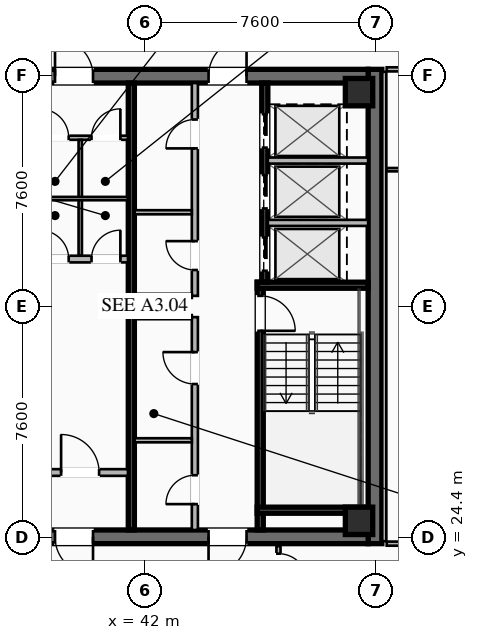
"""IFC4 building model, lengths in metres.
Left out: names, types, materials, properties, quantities, classifications, styles, units other than length and angle.
Written with IfcOpenShell. Run it as: python <this file> out.ifc"""

import sys

from ifc_helpers import new_model, si_unit, direction, frame, frame_2d, origin, origin_2d, place, context, subcontext, project, spatial, rectangle, hollow_rectangle, extrude, element, fill, save


model = new_model("IFC4")
c1 = context("Model", 3, precision=1e-05, world=origin(), true_north=direction((0.0, 1.0)))
c2 = subcontext(c1, "Body", "Model", "MODEL_VIEW")
j1 = project(units=[si_unit("LENGTHUNIT", "METRE"), si_unit("PLANEANGLEUNIT", "RADIAN")], contexts=[c1])
p1 = place(None, origin())
s1 = spatial("IfcSite", under=j1, at=p1, CompositionType="ELEMENT")
p2 = place(p1, origin())
s2 = spatial("IfcBuilding", under=s1, at=p2, CompositionType="ELEMENT")
p3 = place(p2, frame((0.0, 0.0, 218.4)))
s3 = spatial("IfcBuildingStorey", under=s2, at=p3, CompositionType="ELEMENT", Elevation=218.4)
p4 = place(p3, frame((49.575, 39.8, 0.0), z_axis=(0.0, 0.0, 1.0), x_axis=(0.0, -1.0, 0.0)))
e1 = element("IfcWall", 1, at=p4, inside=s3, PredefinedType="SHEAR", context=c2, shape_type="SweptSolid", body=[
    extrude(rectangle(XDim=15.6, YDim=0.45, at=frame_2d((7.8, 0.0))), origin(), (0.0, 0.0, 1.0), 3.55),
])
p5 = place(p3, frame((49.35, 24.425, 0.0), z_axis=(0.0, 0.0, 1.0), x_axis=(-1.0, 0.0, 0.0)))
e2 = element("IfcWall", 2, at=p5, inside=s3, PredefinedType="SHEAR", context=c2, shape_type="SweptSolid", body=[
    extrude(rectangle(XDim=14.7, YDim=0.45, at=frame_2d((7.35, 0.0))), origin(), (0.0, 0.0, 1.0), 3.55),
])
p6 = place(p5, frame((9.05, 0.0, 0.0)))
e3 = element("IfcOpeningElement", 3, at=p6, cuts=e2, PredefinedType="OPENING", context=c2, shape_type="SweptSolid", body=[
    extrude(rectangle(XDim=1.25, YDim=2.25, at=frame_2d((0.625, 1.125))), frame((0.0, 0.235, 0.0), z_axis=(0.0, -1.0, 0.0), x_axis=(1.0, 0.0, 0.0)), (0.0, 0.0, 1.0), 0.47),
])
p7 = place(p5, frame((4.0, 0.0, 0.0)))
e4 = element("IfcOpeningElement", 4, at=p7, cuts=e2, PredefinedType="OPENING", context=c2, shape_type="SweptSolid", body=[
    extrude(rectangle(XDim=1.25, YDim=2.25, at=frame_2d((0.625, 1.125))), frame((0.0, 0.235, 0.0), z_axis=(0.0, -1.0, 0.0), x_axis=(1.0, 0.0, 0.0)), (0.0, 0.0, 1.0), 0.47),
])
p8 = place(p3, frame((34.65, 39.575, 0.0), z_axis=(0.0, 0.0, 1.0), x_axis=(1.0, 0.0, 0.0)))
e5 = element("IfcWall", 5, at=p8, inside=s3, PredefinedType="SHEAR", context=c2, shape_type="SweptSolid", body=[
    extrude(rectangle(XDim=14.7, YDim=0.45, at=frame_2d((7.35, 0.0))), origin(), (0.0, 0.0, 1.0), 3.55),
])
p9 = place(p8, frame((4.4, 0.0, 0.0)))
e6 = element("IfcOpeningElement", 6, at=p9, cuts=e5, PredefinedType="OPENING", context=c2, shape_type="SweptSolid", body=[
    extrude(rectangle(XDim=1.25, YDim=2.25, at=frame_2d((0.625, 1.125))), frame((0.0, 0.235, 0.0), z_axis=(0.0, -1.0, 0.0), x_axis=(1.0, 0.0, 0.0)), (0.0, 0.0, 1.0), 0.47),
])
p10 = place(p8, frame((9.45, 0.0, 0.0)))
e7 = element("IfcOpeningElement", 7, at=p10, cuts=e5, PredefinedType="OPENING", context=c2, shape_type="SweptSolid", body=[
    extrude(rectangle(XDim=1.25, YDim=2.25, at=frame_2d((0.625, 1.125))), frame((0.0, 0.235, 0.0), z_axis=(0.0, -1.0, 0.0), x_axis=(1.0, 0.0, 0.0)), (0.0, 0.0, 1.0), 0.47),
])
for number, where, z_axis, x_axis in (
    (8, (49.05, 24.95, 0.0), (0.0, 0.0, 1.0), (1.0, 0.0, 0.0)),
    (9, (49.05, 39.05, 0.0), (0.0, 0.0, 1.0), (1.0, 0.0, 0.0)),
):
    element("IfcColumn", number, at=place(p3, frame(where, z_axis=z_axis, x_axis=x_axis)), inside=s3, PredefinedType="COLUMN", context=c2, shape_type="SweptSolid", body=[
        extrude(hollow_rectangle(XDim=0.9, YDim=0.9, WallThickness=0.04, at=origin_2d()), origin(), (0.0, 0.0, 1.0), 3.37),
    ])
p11 = place(p3, frame((45.8, 32.8, 0.0), z_axis=(0.0, 0.0, 1.0), x_axis=(0.0, -1.0, 0.0)))
e10 = element("IfcWall", 10, at=p11, inside=s3, PredefinedType="SHEAR", context=c2, shape_type="SweptSolid", body=[
    extrude(rectangle(XDim=8.15, YDim=0.2, at=frame_2d((4.075, 0.0))), origin(), (0.0, 0.0, 1.0), 3.37),
])
p12 = place(p11, frame((0.45, 0.0, 0.0)))
e11 = element("IfcOpeningElement", 11, at=p12, cuts=e10, PredefinedType="OPENING", context=c2, shape_type="SweptSolid", body=[
    extrude(rectangle(XDim=1.15, YDim=2.2, at=frame_2d((0.575, 1.1))), frame((0.0, 0.11, 0.0), z_axis=(0.0, -1.0, 0.0), x_axis=(1.0, 0.0, 0.0)), (0.0, 0.0, 1.0), 0.22),
])
for number, where, z_axis, x_axis in (
    (12, (45.7, 32.7, 0.0), (0.0, 0.0, 1.0), (1.0, 0.0, 0.0)),
    (13, (45.7, 25.3, 0.0), (0.0, 0.0, 1.0), (1.0, 0.0, 0.0)),
):
    element("IfcWall", number, at=place(p3, frame(where, z_axis=z_axis, x_axis=x_axis)), inside=s3, PredefinedType="SHEAR", context=c2, shape_type="SweptSolid", body=[
        extrude(rectangle(XDim=3.65, YDim=0.2, at=frame_2d((1.825, 0.0))), origin(), (0.0, 0.0, 1.0), 3.37),
    ])
p13 = place(p3, frame((41.56, 24.65, 0.0), z_axis=(0.0, 0.0, 1.0), x_axis=(0.0, 1.0, 0.0)))
e14 = element("IfcWall", 14, at=p13, inside=s3, PredefinedType="SHEAR", context=c2, shape_type="SweptSolid", body=[
    extrude(rectangle(XDim=14.7, YDim=0.2, at=frame_2d((7.35, 0.0))), origin(), (0.0, 0.0, 1.0), 3.37),
])
p14 = place(p3, frame((38.3, 33.56, 0.0), z_axis=(0.0, 0.0, 1.0), x_axis=(1.0, 0.0, 0.0)))
e15 = element("IfcWall", 15, at=p14, inside=s3, PredefinedType="SOLIDWALL", context=c2, shape_type="SweptSolid", body=[
    extrude(rectangle(XDim=3.15, YDim=0.22, at=frame_2d((1.575, 0.0))), origin(), (0.0, 0.0, 1.0), 2.723),
])
p15 = place(p14, frame((0.25, 0.0, 0.0)))
e16 = element("IfcOpeningElement", 16, at=p15, cuts=e15, PredefinedType="OPENING", context=c2, shape_type="SweptSolid", body=[
    extrude(rectangle(XDim=0.95, YDim=2.05, at=frame_2d((0.475, 1.025))), frame((0.0, 0.12, 0.0), z_axis=(0.0, -1.0, 0.0), x_axis=(1.0, 0.0, 0.0)), (0.0, 0.0, 1.0), 0.24),
])
p16 = place(p14, frame((1.95, 0.0, 0.0)))
e17 = element("IfcOpeningElement", 17, at=p16, cuts=e15, PredefinedType="OPENING", context=c2, shape_type="SweptSolid", body=[
    extrude(rectangle(XDim=0.95, YDim=2.05, at=frame_2d((0.475, 1.025))), frame((0.0, 0.12, 0.0), z_axis=(0.0, -1.0, 0.0), x_axis=(1.0, 0.0, 0.0)), (0.0, 0.0, 1.0), 0.24),
])
p17 = place(p3, frame((38.3, 26.54, 0.0), z_axis=(0.0, 0.0, 1.0), x_axis=(1.0, 0.0, 0.0)))
e18 = element("IfcWall", 18, at=p17, inside=s3, PredefinedType="SOLIDWALL", context=c2, shape_type="SweptSolid", body=[
    extrude(rectangle(XDim=3.15, YDim=0.22, at=frame_2d((1.575, 0.0))), origin(), (0.0, 0.0, 1.0), 2.723),
])
p18 = place(p17, frame((0.95, 0.0, 0.0)))
e19 = element("IfcOpeningElement", 19, at=p18, cuts=e18, PredefinedType="OPENING", context=c2, shape_type="SweptSolid", body=[
    extrude(rectangle(XDim=1.25, YDim=2.25, at=frame_2d((0.625, 1.125))), frame((0.0, 0.12, 0.0), z_axis=(0.0, -1.0, 0.0), x_axis=(1.0, 0.0, 0.0)), (0.0, 0.0, 1.0), 0.24),
])
p19 = place(p3, frame((45.95, 39.35, 0.0), z_axis=(0.0, 0.0, 1.0), x_axis=(0.0, -1.0, 0.0)))
e20 = element("IfcWall", 20, at=p19, inside=s3, PredefinedType="SHEAR", context=c2, shape_type="SweptSolid", body=[
    extrude(rectangle(XDim=6.55, YDim=0.2, at=frame_2d((3.275, 0.0))), origin(), (0.0, 0.0, 1.0), 3.37),
])
p20 = place(p19, frame((5.075, 0.0, 0.0)))
e21 = element("IfcOpeningElement", 21, at=p20, cuts=e20, PredefinedType="OPENING", context=c2, shape_type="SweptSolid", body=[
    extrude(rectangle(XDim=1.1, YDim=2.2, at=frame_2d((0.55, 1.1))), frame((0.0, 0.11, 0.0), z_axis=(0.0, -1.0, 0.0), x_axis=(1.0, 0.0, 0.0)), (0.0, 0.0, 1.0), 0.22),
])
p21 = place(p19, frame((3.025, 0.0, 0.0)))
e22 = element("IfcOpeningElement", 22, at=p21, cuts=e20, PredefinedType="OPENING", context=c2, shape_type="SweptSolid", body=[
    extrude(rectangle(XDim=1.1, YDim=2.2, at=frame_2d((0.55, 1.1))), frame((0.0, 0.11, 0.0), z_axis=(0.0, -1.0, 0.0), x_axis=(1.0, 0.0, 0.0)), (0.0, 0.0, 1.0), 0.22),
])
p22 = place(p19, frame((1.025, 0.0, 0.0)))
e23 = element("IfcOpeningElement", 23, at=p22, cuts=e20, PredefinedType="OPENING", context=c2, shape_type="SweptSolid", body=[
    extrude(rectangle(XDim=1.1, YDim=2.2, at=frame_2d((0.55, 1.1))), frame((0.0, 0.11, 0.0), z_axis=(0.0, -1.0, 0.0), x_axis=(1.0, 0.0, 0.0)), (0.0, 0.0, 1.0), 0.22),
])
for number, where, z_axis, x_axis in (
    (24, (46.05, 34.75, 0.0), (0.0, 0.0, 1.0), (1.0, 0.0, 0.0)),
    (25, (46.05, 36.8, 0.0), (0.0, 0.0, 1.0), (1.0, 0.0, 0.0)),
):
    element("IfcWall", number, at=place(p3, frame(where, z_axis=z_axis, x_axis=x_axis)), inside=s3, PredefinedType="SOLIDWALL", context=c2, shape_type="SweptSolid", body=[
        extrude(rectangle(XDim=3.3, YDim=0.2, at=frame_2d((1.65, 0.0))), origin(), (0.0, 0.0, 1.0), 3.37),
    ])
p23 = place(p3, frame((38.3, 37.55, 0.0), z_axis=(0.0, 0.0, 1.0), x_axis=(1.0, 0.0, 0.0)))
e26 = element("IfcWall", 26, at=p23, inside=s3, PredefinedType="PARTITIONING", context=c2, shape_type="SweptSolid", body=[
    extrude(rectangle(XDim=3.15, YDim=0.135, at=frame_2d((1.575, 0.0))), origin(), (0.0, 0.0, 1.0), 2.723),
])
p24 = place(p23, frame((0.25, 0.0, 0.0)))
e27 = element("IfcOpeningElement", 27, at=p24, cuts=e26, PredefinedType="OPENING", context=c2, shape_type="SweptSolid", body=[
    extrude(rectangle(XDim=0.95, YDim=2.05, at=frame_2d((0.475, 1.025))), frame((0.0, 0.077, 0.0), z_axis=(0.0, -1.0, 0.0), x_axis=(1.0, 0.0, 0.0)), (0.0, 0.0, 1.0), 0.155),
])
p25 = place(p23, frame((1.95, 0.0, 0.0)))
e28 = element("IfcOpeningElement", 28, at=p25, cuts=e26, PredefinedType="OPENING", context=c2, shape_type="SweptSolid", body=[
    extrude(rectangle(XDim=0.95, YDim=2.05, at=frame_2d((0.475, 1.025))), frame((0.0, 0.077, 0.0), z_axis=(0.0, -1.0, 0.0), x_axis=(1.0, 0.0, 0.0)), (0.0, 0.0, 1.0), 0.155),
])
p26 = place(p3, frame((39.88, 33.68, 0.0), z_axis=(0.0, 0.0, 1.0), x_axis=(0.0, 1.0, 0.0)))
e29 = element("IfcWall", 29, at=p26, inside=s3, PredefinedType="PARTITIONING", context=c2, shape_type="SweptSolid", body=[
    extrude(rectangle(XDim=3.8, YDim=0.11, at=frame_2d((1.9, 0.0))), origin(), (0.0, 0.0, 1.0), 2.723),
])
p27 = place(p3, frame((38.3, 35.55, 0.0), z_axis=(0.0, 0.0, 1.0), x_axis=(1.0, 0.0, 0.0)))
e30 = element("IfcWall", 30, at=p27, inside=s3, PredefinedType="PARTITIONING", context=c2, shape_type="SweptSolid", body=[
    extrude(rectangle(XDim=3.15, YDim=0.11, at=frame_2d((1.575, 0.0))), origin(), (0.0, 0.0, 1.0), 2.723),
])
p28 = place(p3, frame((43.65, 24.65, 0.0), z_axis=(0.0, 0.0, 1.0), x_axis=(0.0, 1.0, 0.0)))
e31 = element("IfcWall", 31, at=p28, inside=s3, PredefinedType="SOLIDWALL", context=c2, shape_type="SweptSolid", body=[
    extrude(rectangle(XDim=7.0, YDim=0.2, at=frame_2d((3.5, 0.0))), origin(), (0.0, 0.0, 1.0), 2.723),
])
p29 = place(p28, frame((0.85, 0.0, 0.0)))
e32 = element("IfcOpeningElement", 32, at=p29, cuts=e31, PredefinedType="OPENING", context=c2, shape_type="SweptSolid", body=[
    extrude(rectangle(XDim=0.95, YDim=2.05, at=frame_2d((0.475, 1.025))), frame((0.0, 0.11, 0.0), z_axis=(0.0, -1.0, 0.0), x_axis=(1.0, 0.0, 0.0)), (0.0, 0.0, 1.0), 0.22),
])
p30 = place(p28, frame((4.8, 0.0, 0.0)))
e33 = element("IfcOpeningElement", 33, at=p30, cuts=e31, PredefinedType="OPENING", context=c2, shape_type="SweptSolid", body=[
    extrude(rectangle(XDim=1.05, YDim=2.2, at=frame_2d((0.525, 1.1))), frame((0.0, 0.11, 0.0), z_axis=(0.0, -1.0, 0.0), x_axis=(1.0, 0.0, 0.0)), (0.0, 0.0, 1.0), 0.22),
])
for number, where, z_axis, x_axis in (
    (34, (41.67, 31.65, 0.0), (0.0, 0.0, 1.0), (1.0, 0.0, 0.0)),
    (35, (41.67, 27.6, 0.0), (0.0, 0.0, 1.0), (1.0, 0.0, 0.0)),
):
    element("IfcWall", number, at=place(p3, frame(where, z_axis=z_axis, x_axis=x_axis)), inside=s3, PredefinedType="PARTITIONING", context=c2, shape_type="SweptSolid", body=[
        extrude(rectangle(XDim=1.88, YDim=0.135, at=frame_2d((0.94, 0.0))), origin(), (0.0, 0.0, 1.0), 2.723),
    ])
p31 = place(p3, frame((43.65, 32.35, 0.0), z_axis=(0.0, 0.0, 1.0), x_axis=(0.0, 1.0, 0.0)))
e36 = element("IfcWall", 36, at=p31, inside=s3, PredefinedType="SOLIDWALL", context=c2, shape_type="SweptSolid", body=[
    extrude(rectangle(XDim=7.0, YDim=0.2, at=frame_2d((3.5, 0.0))), origin(), (0.0, 0.0, 1.0), 2.723),
])
p32 = place(p31, frame((0.85, 0.0, 0.0)))
e37 = element("IfcOpeningElement", 37, at=p32, cuts=e36, PredefinedType="OPENING", context=c2, shape_type="SweptSolid", body=[
    extrude(rectangle(XDim=0.95, YDim=2.05, at=frame_2d((0.475, 1.025))), frame((0.0, 0.11, 0.0), z_axis=(0.0, -1.0, 0.0), x_axis=(1.0, 0.0, 0.0)), (0.0, 0.0, 1.0), 0.22),
])
p33 = place(p31, frame((4.85, 0.0, 0.0)))
e38 = element("IfcOpeningElement", 38, at=p33, cuts=e36, PredefinedType="OPENING", context=c2, shape_type="SweptSolid", body=[
    extrude(rectangle(XDim=0.95, YDim=2.05, at=frame_2d((0.475, 1.025))), frame((0.0, 0.11, 0.0), z_axis=(0.0, -1.0, 0.0), x_axis=(1.0, 0.0, 0.0)), (0.0, 0.0, 1.0), 0.22),
])
for number, where, z_axis, x_axis in (
    (39, (41.67, 32.35, 0.0), (0.0, 0.0, 1.0), (1.0, 0.0, 0.0)),
    (40, (41.67, 35.1, 0.0), (0.0, 0.0, 1.0), (1.0, 0.0, 0.0)),
):
    element("IfcWall", number, at=place(p3, frame(where, z_axis=z_axis, x_axis=x_axis)), inside=s3, PredefinedType="PARTITIONING", context=c2, shape_type="SweptSolid", body=[
        extrude(rectangle(XDim=1.88, YDim=0.135, at=frame_2d((0.94, 0.0))), origin(), (0.0, 0.0, 1.0), 2.723),
    ])
p34 = place(p3, frame((46.4, 24.12, 0.0), z_axis=(0.0, 0.0, 1.0), x_axis=(0.0, -1.0, 0.0)))
e41 = element("IfcWall", 41, at=p34, inside=s3, PredefinedType="PARTITIONING", context=c2, shape_type="SweptSolid", body=[
    extrude(rectangle(XDim=1.39, YDim=0.135, at=frame_2d((0.695, 0.0))), origin(), (0.0, 0.0, 1.0), 2.723),
])
p35 = place(p34, frame((0.25, 0.0, 0.0)))
e42 = element("IfcOpeningElement", 42, at=p35, cuts=e41, PredefinedType="OPENING", context=c2, shape_type="SweptSolid", body=[
    extrude(rectangle(XDim=0.95, YDim=2.05, at=frame_2d((0.475, 1.025))), frame((0.0, 0.077, 0.0), z_axis=(0.0, -1.0, 0.0), x_axis=(1.0, 0.0, 0.0)), (0.0, 0.0, 1.0), 0.155),
])
p36 = place(p3, frame((49.88, 39.72, 0.0), z_axis=(0.0, 0.0, 1.0), x_axis=(0.0, -1.0, 0.0)))
e43 = element("IfcWall", 43, at=p36, inside=s3, PredefinedType="PARTITIONING", context=c2, shape_type="SweptSolid", body=[
    extrude(rectangle(XDim=15.44, YDim=0.135, at=frame_2d((7.72, 0.0))), origin(), (0.0, 0.0, 1.0), 2.723),
])
p37 = place(p3, frame((58.28, 39.8, 0.0), z_axis=(0.0, 0.0, 1.0), x_axis=(-1.0, 0.0, 0.0)))
e44 = element("IfcWall", 44, at=p37, inside=s3, PredefinedType="PARTITIONING", context=c2, shape_type="SweptSolid", body=[
    extrude(rectangle(XDim=8.32, YDim=0.135, at=frame_2d((4.16, 0.0))), origin(), (0.0, 0.0, 1.0), 2.723),
])
p38 = place(p37, frame((6.88, 0.0, 0.0)))
e45 = element("IfcOpeningElement", 45, at=p38, cuts=e44, PredefinedType="OPENING", context=c2, shape_type="SweptSolid", body=[
    extrude(rectangle(XDim=0.95, YDim=2.05, at=frame_2d((0.475, 1.025))), frame((0.0, 0.077, 0.0), z_axis=(0.0, -1.0, 0.0), x_axis=(1.0, 0.0, 0.0)), (0.0, 0.0, 1.0), 0.155),
])
p39 = place(p3, frame((49.96, 24.2, 0.0), z_axis=(0.0, 0.0, 1.0), x_axis=(1.0, 0.0, 0.0)))
e46 = element("IfcWall", 46, at=p39, inside=s3, PredefinedType="PARTITIONING", context=c2, shape_type="SweptSolid", body=[
    extrude(rectangle(XDim=8.32, YDim=0.135, at=frame_2d((4.16, 0.0))), origin(), (0.0, 0.0, 1.0), 2.723),
])
p40 = place(p3, frame((49.96, 36.5, 0.0), z_axis=(0.0, 0.0, 1.0), x_axis=(1.0, 0.0, 0.0)))
e47 = element("IfcWall", 47, at=p40, inside=s3, PredefinedType="PARTITIONING", context=c2, shape_type="SweptSolid", body=[
    extrude(rectangle(XDim=8.32, YDim=0.11, at=frame_2d((4.16, 0.0))), origin(), (0.0, 0.0, 1.0), 2.723),
])
p41 = place(p40, frame((1.8, 0.0, 0.0)))
e48 = element("IfcOpeningElement", 48, at=p41, cuts=e47, PredefinedType="OPENING", context=c2, shape_type="SweptSolid", body=[
    extrude(rectangle(XDim=0.95, YDim=2.05, at=frame_2d((0.475, 1.025))), frame((0.0, 0.065, 0.0), z_axis=(0.0, -1.0, 0.0), x_axis=(1.0, 0.0, 0.0)), (0.0, 0.0, 1.0), 0.13),
])
p42 = place(p9, origin())
e49 = element("IfcDoor", 49, at=p42, inside=s3, OperationType="SINGLE_SWING_LEFT", PredefinedType="DOOR", context=c2, shape_type="SweptSolid", body=[
    extrude(rectangle(XDim=1.25, YDim=2.25, at=frame_2d((0.625, 1.125))), frame((0.0, 0.025, 0.0), z_axis=(0.0, -1.0, 0.0), x_axis=(1.0, 0.0, 0.0)), (0.0, 0.0, 1.0), 0.05),
])
fill(e6, e49)
p43 = place(p10, origin())
e50 = element("IfcDoor", 50, at=p43, inside=s3, OperationType="SINGLE_SWING_RIGHT", PredefinedType="DOOR", context=c2, shape_type="SweptSolid", body=[
    extrude(rectangle(XDim=1.25, YDim=2.25, at=frame_2d((0.625, 1.125))), frame((0.0, 0.025, 0.0), z_axis=(0.0, -1.0, 0.0), x_axis=(1.0, 0.0, 0.0)), (0.0, 0.0, 1.0), 0.05),
])
fill(e7, e50)
p44 = place(p6, origin())
e51 = element("IfcDoor", 51, at=p44, inside=s3, OperationType="SINGLE_SWING_LEFT", PredefinedType="DOOR", context=c2, shape_type="SweptSolid", body=[
    extrude(rectangle(XDim=1.25, YDim=2.25, at=frame_2d((0.625, 1.125))), frame((0.0, 0.025, 0.0), z_axis=(0.0, -1.0, 0.0), x_axis=(1.0, 0.0, 0.0)), (0.0, 0.0, 1.0), 0.05),
])
fill(e3, e51)
p45 = place(p7, origin())
e52 = element("IfcDoor", 52, at=p45, inside=s3, OperationType="SINGLE_SWING_RIGHT", PredefinedType="DOOR", context=c2, shape_type="SweptSolid", body=[
    extrude(rectangle(XDim=1.25, YDim=2.25, at=frame_2d((0.625, 1.125))), frame((0.0, 0.025, 0.0), z_axis=(0.0, -1.0, 0.0), x_axis=(1.0, 0.0, 0.0)), (0.0, 0.0, 1.0), 0.05),
])
fill(e4, e52)
p46 = place(p12, origin())
e53 = element("IfcDoor", 53, at=p46, inside=s3, OperationType="SINGLE_SWING_RIGHT", PredefinedType="DOOR", context=c2, shape_type="SweptSolid", body=[
    extrude(rectangle(XDim=1.15, YDim=2.2, at=frame_2d((0.575, 1.1))), frame((0.0, 0.025, 0.0), z_axis=(0.0, -1.0, 0.0), x_axis=(1.0, 0.0, 0.0)), (0.0, 0.0, 1.0), 0.05),
])
fill(e11, e53)
p47 = place(p18, origin())
e54 = element("IfcDoor", 54, at=p47, inside=s3, OperationType="SINGLE_SWING_LEFT", PredefinedType="DOOR", context=c2, shape_type="SweptSolid", body=[
    extrude(rectangle(XDim=1.25, YDim=2.25, at=frame_2d((0.625, 1.125))), frame((0.0, 0.025, 0.0), z_axis=(0.0, -1.0, 0.0), x_axis=(1.0, 0.0, 0.0)), (0.0, 0.0, 1.0), 0.05),
])
fill(e19, e54)
p48 = place(p24, origin())
e55 = element("IfcDoor", 55, at=p48, inside=s3, OperationType="SINGLE_SWING_LEFT", PredefinedType="DOOR", context=c2, shape_type="SweptSolid", body=[
    extrude(rectangle(XDim=0.95, YDim=2.05, at=frame_2d((0.475, 1.025))), frame((0.0, 0.025, 0.0), z_axis=(0.0, -1.0, 0.0), x_axis=(1.0, 0.0, 0.0)), (0.0, 0.0, 1.0), 0.05),
])
fill(e27, e55)
p49 = place(p25, origin())
e56 = element("IfcDoor", 56, at=p49, inside=s3, OperationType="SINGLE_SWING_RIGHT", PredefinedType="DOOR", context=c2, shape_type="SweptSolid", body=[
    extrude(rectangle(XDim=0.95, YDim=2.05, at=frame_2d((0.475, 1.025))), frame((0.0, 0.025, 0.0), z_axis=(0.0, -1.0, 0.0), x_axis=(1.0, 0.0, 0.0)), (0.0, 0.0, 1.0), 0.05),
])
fill(e28, e56)
p50 = place(p15, origin())
e57 = element("IfcDoor", 57, at=p50, inside=s3, OperationType="SINGLE_SWING_LEFT", PredefinedType="DOOR", context=c2, shape_type="SweptSolid", body=[
    extrude(rectangle(XDim=0.95, YDim=2.05, at=frame_2d((0.475, 1.025))), frame((0.0, 0.025, 0.0), z_axis=(0.0, -1.0, 0.0), x_axis=(1.0, 0.0, 0.0)), (0.0, 0.0, 1.0), 0.05),
])
fill(e16, e57)
p51 = place(p16, origin())
e58 = element("IfcDoor", 58, at=p51, inside=s3, OperationType="SINGLE_SWING_RIGHT", PredefinedType="DOOR", context=c2, shape_type="SweptSolid", body=[
    extrude(rectangle(XDim=0.95, YDim=2.05, at=frame_2d((0.475, 1.025))), frame((0.0, 0.025, 0.0), z_axis=(0.0, -1.0, 0.0), x_axis=(1.0, 0.0, 0.0)), (0.0, 0.0, 1.0), 0.05),
])
fill(e17, e58)
p52 = place(p29, origin())
e59 = element("IfcDoor", 59, at=p52, inside=s3, OperationType="SINGLE_SWING_LEFT", PredefinedType="DOOR", context=c2, shape_type="SweptSolid", body=[
    extrude(rectangle(XDim=0.95, YDim=2.05, at=frame_2d((0.475, 1.025))), frame((0.0, 0.025, 0.0), z_axis=(0.0, -1.0, 0.0), x_axis=(1.0, 0.0, 0.0)), (0.0, 0.0, 1.0), 0.05),
])
fill(e32, e59)
p53 = place(p30, origin())
e60 = element("IfcDoor", 60, at=p53, inside=s3, OperationType="SINGLE_SWING_RIGHT", PredefinedType="DOOR", context=c2, shape_type="SweptSolid", body=[
    extrude(rectangle(XDim=1.05, YDim=2.2, at=frame_2d((0.525, 1.1))), frame((0.0, 0.025, 0.0), z_axis=(0.0, -1.0, 0.0), x_axis=(1.0, 0.0, 0.0)), (0.0, 0.0, 1.0), 0.05),
])
fill(e33, e60)
p54 = place(p32, origin())
e61 = element("IfcDoor", 61, at=p54, inside=s3, OperationType="SINGLE_SWING_RIGHT", PredefinedType="DOOR", context=c2, shape_type="SweptSolid", body=[
    extrude(rectangle(XDim=0.95, YDim=2.05, at=frame_2d((0.475, 1.025))), frame((0.0, 0.025, 0.0), z_axis=(0.0, -1.0, 0.0), x_axis=(1.0, 0.0, 0.0)), (0.0, 0.0, 1.0), 0.05),
])
fill(e37, e61)
p55 = place(p33, origin())
e62 = element("IfcDoor", 62, at=p55, inside=s3, OperationType="SINGLE_SWING_LEFT", PredefinedType="DOOR", context=c2, shape_type="SweptSolid", body=[
    extrude(rectangle(XDim=0.95, YDim=2.05, at=frame_2d((0.475, 1.025))), frame((0.0, 0.025, 0.0), z_axis=(0.0, -1.0, 0.0), x_axis=(1.0, 0.0, 0.0)), (0.0, 0.0, 1.0), 0.05),
])
fill(e38, e62)
p56 = place(p35, origin())
e63 = element("IfcDoor", 63, at=p56, inside=s3, OperationType="SINGLE_SWING_RIGHT", PredefinedType="DOOR", context=c2, shape_type="SweptSolid", body=[
    extrude(rectangle(XDim=0.95, YDim=2.05, at=frame_2d((0.475, 1.025))), frame((0.0, 0.025, 0.0), z_axis=(0.0, -1.0, 0.0), x_axis=(1.0, 0.0, 0.0)), (0.0, 0.0, 1.0), 0.05),
])
fill(e42, e63)
p57 = place(p20, origin())
e64 = element("IfcDoor", 64, at=p57, inside=s3, OperationType="SLIDING_TO_LEFT", PredefinedType="DOOR", context=c2, shape_type="SweptSolid", body=[
    extrude(rectangle(XDim=1.1, YDim=2.2, at=frame_2d((0.55, 1.1))), frame((0.0, 0.025, 0.0), z_axis=(0.0, -1.0, 0.0), x_axis=(1.0, 0.0, 0.0)), (0.0, 0.0, 1.0), 0.05),
])
fill(e21, e64)
p58 = place(p21, origin())
e65 = element("IfcDoor", 65, at=p58, inside=s3, OperationType="SLIDING_TO_LEFT", PredefinedType="DOOR", context=c2, shape_type="SweptSolid", body=[
    extrude(rectangle(XDim=1.1, YDim=2.2, at=frame_2d((0.55, 1.1))), frame((0.0, 0.025, 0.0), z_axis=(0.0, -1.0, 0.0), x_axis=(1.0, 0.0, 0.0)), (0.0, 0.0, 1.0), 0.05),
])
fill(e22, e65)
p59 = place(p22, origin())
e66 = element("IfcDoor", 66, at=p59, inside=s3, OperationType="SLIDING_TO_LEFT", PredefinedType="DOOR", context=c2, shape_type="SweptSolid", body=[
    extrude(rectangle(XDim=1.1, YDim=2.2, at=frame_2d((0.55, 1.1))), frame((0.0, 0.025, 0.0), z_axis=(0.0, -1.0, 0.0), x_axis=(1.0, 0.0, 0.0)), (0.0, 0.0, 1.0), 0.05),
])
fill(e23, e66)
save(model, sys.argv[1])
